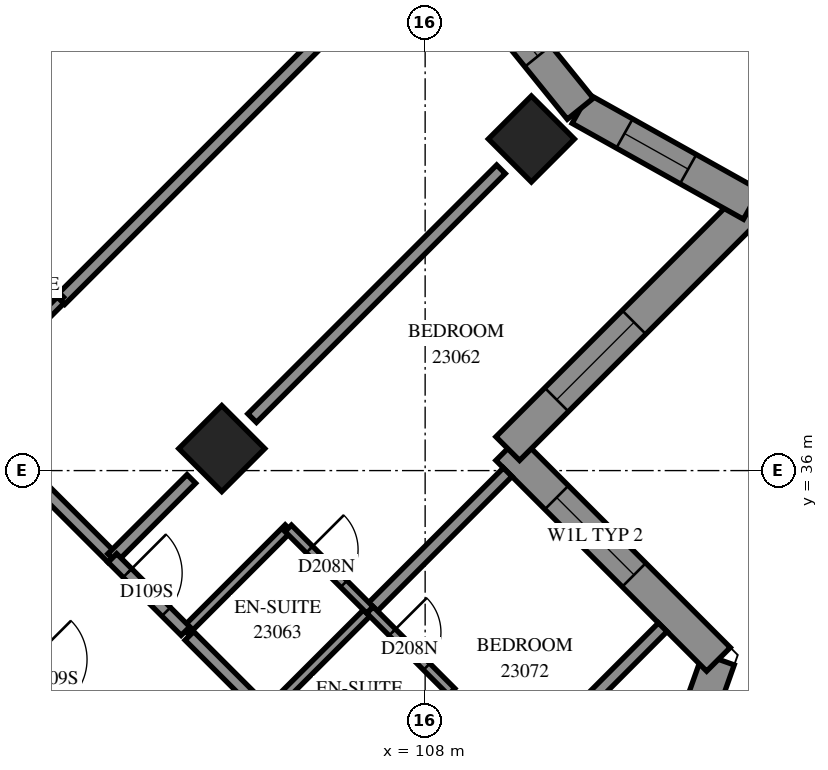
"""IFC4 building model, lengths in metres.
Left out: names, types, materials, properties, quantities, classifications, styles, units other than length and angle.
Written with IfcOpenShell. Run it as: python <this file> out.ifc"""

import sys

from ifc_helpers import new_model, si_unit, direction, frame, frame_2d, origin, origin_2d, place, context, subcontext, project, spatial, polyline, rectangle, outline, extrude, element, fill, save


model = new_model("IFC4")
c1 = context("Model", 3, precision=1e-05, world=origin(), true_north=direction((0.0, 1.0)))
c2 = subcontext(c1, "Body", "Model", "MODEL_VIEW")
j1 = project(units=[si_unit("LENGTHUNIT", "METRE"), si_unit("PLANEANGLEUNIT", "RADIAN")], contexts=[c1])
p1 = place(None, origin())
s1 = spatial("IfcSite", under=j1, at=p1, CompositionType="ELEMENT")
p2 = place(p1, origin())
s2 = spatial("IfcBuilding", under=s1, at=p2, CompositionType="ELEMENT")
p3 = place(p2, frame((0.0, 0.0, 88.0)))
s3 = spatial("IfcBuildingStorey", under=s2, at=p3, CompositionType="ELEMENT", Elevation=88.0)
for number, where, z_axis, x_axis in (
    (1, (109.747, 41.453, 0.0), (0.0, 0.0, 1.0), (0.707, -0.707, 0.0)),
    (2, (104.656, 36.362, 0.0), (0.0, 0.0, 1.0), (0.707, -0.707, 0.0)),
):
    element("IfcColumn", number, at=place(p3, frame(where, z_axis=z_axis, x_axis=x_axis)), inside=s3, PredefinedType="COLUMN", context=c2, shape_type="SweptSolid", body=[
        extrude(rectangle(XDim=1.0, YDim=1.0, at=origin_2d()), origin(), (0.0, 0.0, 1.0), 3.1),
    ])
p4 = place(p3, frame((111.057, 27.917, 0.0), z_axis=(0.0, 0.0, 1.0), x_axis=(0.334430452, 0.9424204331, 0.0)))
e3 = element("IfcWall", 3, at=p4, inside=s3, PredefinedType="SOLIDWALL", context=c2, shape_type="SweptSolid", body=[
    extrude(outline(polyline([(-0.125, -0.275), (5.457, -0.275), (5.11, 0.275), (0.125, 0.275), (-0.125, -0.275)])), origin(), (0.0, 0.0, 1.0), 3.1),
])
p5 = place(p4, frame((1.447, 0.0, 0.5)))
e4 = element("IfcOpeningElement", 4, at=p5, cuts=e3, PredefinedType="OPENING", context=c2, shape_type="SweptSolid", body=[
    extrude(rectangle(XDim=1.3, YDim=2.45, at=frame_2d((0.65, 1.225))), frame((0.0, 0.285, 0.0), z_axis=(0.0, -1.0, 0.0), x_axis=(1.0, 0.0, 0.0)), (0.0, 0.0, 1.0), 0.57),
])
p6 = place(p4, frame((2.947, 0.0, 0.5)))
e5 = element("IfcOpeningElement", 5, at=p6, cuts=e3, PredefinedType="OPENING", context=c2, shape_type="SweptSolid", body=[
    extrude(rectangle(XDim=1.3, YDim=2.45, at=frame_2d((0.65, 1.225))), frame((0.0, 0.285, 0.0), z_axis=(0.0, -1.0, 0.0), x_axis=(1.0, 0.0, 0.0)), (0.0, 0.0, 1.0), 0.57),
])
p7 = place(p3, frame((112.824, 32.896, 0.0), z_axis=(0.0, 0.0, 1.0), x_axis=(-0.7071067812, 0.7071067812, 0.0)))
e6 = element("IfcWall", 6, at=p7, inside=s3, PredefinedType="SOLIDWALL", context=c2, shape_type="SweptSolid", body=[
    extrude(outline(polyline([(-0.174, -0.275), (4.626, -0.275), (5.176, 0.275), (0.174, 0.275), (-0.174, -0.275)])), origin(), (0.0, 0.0, 1.0), 3.1),
])
p8 = place(p7, frame((1.964, 0.0, 0.6)))
e7 = element("IfcOpeningElement", 7, at=p8, cuts=e6, PredefinedType="OPENING", context=c2, shape_type="SweptSolid", body=[
    extrude(rectangle(XDim=1.8, YDim=1.9, at=frame_2d((0.9, 0.95))), frame((0.0, 0.285, 0.0), z_axis=(0.0, -1.0, 0.0), x_axis=(1.0, 0.0, 0.0)), (0.0, 0.0, 1.0), 0.57),
])
p9 = place(p3, frame((109.358, 36.362, 0.0), z_axis=(0.0, 0.0, 1.0), x_axis=(0.7071067812, 0.7071067812, 0.0)))
e8 = element("IfcWall", 8, at=p9, inside=s3, PredefinedType="SOLIDWALL", context=c2, shape_type="SweptSolid", body=[
    extrude(outline(polyline([(0.275, -0.275), (6.036, -0.275), (5.309, 0.275), (-0.275, 0.275), (0.275, -0.275)])), origin(), (0.0, 0.0, 1.0), 3.1),
])
p10 = place(p9, frame((1.137, 0.0, 0.6)))
e9 = element("IfcOpeningElement", 9, at=p10, cuts=e8, PredefinedType="OPENING", context=c2, shape_type="SweptSolid", body=[
    extrude(rectangle(XDim=1.8, YDim=1.9, at=frame_2d((0.9, 0.95))), frame((0.0, 0.285, 0.0), z_axis=(0.0, -1.0, 0.0), x_axis=(1.0, 0.0, 0.0)), (0.0, 0.0, 1.0), 0.57),
])
p11 = place(p3, frame((113.369, 40.373, 0.0), z_axis=(0.0, 0.0, 1.0), x_axis=(-0.8725208006, 0.4885769668, 0.0)))
e10 = element("IfcWall", 10, at=p11, inside=s3, PredefinedType="SOLIDWALL", context=c2, shape_type="SweptSolid", body=[
    extrude(outline(polyline([(-0.363, -0.275), (3.176, -0.275), (3.282, 0.275), (0.363, 0.275), (-0.363, -0.275)])), origin(), (0.0, 0.0, 1.0), 3.1),
])
p12 = place(p11, frame((1.196, 0.0, 0.5)))
e11 = element("IfcOpeningElement", 11, at=p12, cuts=e10, PredefinedType="OPENING", context=c2, shape_type="SweptSolid", body=[
    extrude(rectangle(XDim=1.2, YDim=2.45, at=frame_2d((0.6, 1.225))), frame((0.0, 0.285, 0.0), z_axis=(0.0, -1.0, 0.0), x_axis=(1.0, 0.0, 0.0)), (0.0, 0.0, 1.0), 0.57),
])
p13 = place(p3, frame((110.552, 41.951, 0.0), z_axis=(0.0, 0.0, 1.0), x_axis=(-0.6286568792, 0.7776827941, 0.0)))
e12 = element("IfcWall", 12, at=p13, inside=s3, PredefinedType="SOLIDWALL", context=c2, shape_type="SweptSolid", body=[
    extrude(outline(polyline([(0.053, -0.275), (3.479, -0.275), (3.421, 0.275), (-0.053, 0.275), (0.053, -0.275)])), origin(), (0.0, 0.0, 1.0), 3.1),
])
p14 = place(p13, frame((1.11, 0.0, 0.5)))
e13 = element("IfcOpeningElement", 13, at=p14, cuts=e12, PredefinedType="OPENING", context=c2, shape_type="SweptSolid", body=[
    extrude(rectangle(XDim=1.2, YDim=2.45, at=frame_2d((0.6, 1.225))), frame((0.0, 0.285, 0.0), z_axis=(0.0, -1.0, 0.0), x_axis=(1.0, 0.0, 0.0)), (0.0, 0.0, 1.0), 0.57),
])
p15 = place(p3, frame((95.215, 42.197, 0.0), z_axis=(0.0, 0.0, 1.0), x_axis=(0.7071067812, 0.7071067812, 0.0)))
e14 = element("IfcWall", 14, at=p15, inside=s3, PredefinedType="PARTITIONING", context=c2, shape_type="SweptSolid", body=[
    extrude(rectangle(XDim=10.675, YDim=0.2, at=frame_2d((5.338, 0.0))), origin(), (0.0, 0.0, 1.0), 3.1),
])
p16 = place(p3, frame((102.002, 38.804, 0.0), z_axis=(0.0, 0.0, 1.0), x_axis=(0.7072390372, 0.7069745004, 0.0)))
e15 = element("IfcWall", 15, at=p16, inside=s3, PredefinedType="PARTITIONING", context=c2, shape_type="SweptSolid", body=[
    extrude(rectangle(XDim=8.316, YDim=0.2, at=frame_2d((4.158, 0.0))), origin(), (0.0, 0.0, 1.0), 3.1),
])
p17 = place(p3, frame((101.365, 33.071, 0.0), z_axis=(0.0, 0.0, 1.0), x_axis=(0.7071067812, -0.7071067812, 0.0)))
e16 = element("IfcWall", 16, at=p17, inside=s3, PredefinedType="PARTITIONING", context=c2, shape_type="SweptSolid", body=[
    extrude(rectangle(XDim=7.2, YDim=0.2, at=frame_2d((3.6, 0.0))), origin(), (0.0, 0.0, 1.0), 3.1),
])
p18 = place(p17, frame((0.248, 0.0, 0.0)))
e17 = element("IfcOpeningElement", 17, at=p18, cuts=e16, PredefinedType="OPENING", context=c2, shape_type="SweptSolid", body=[
    extrude(rectangle(XDim=0.9, YDim=2.1, at=frame_2d((0.45, 1.05))), frame((0.0, 0.11, 0.0), z_axis=(0.0, -1.0, 0.0), x_axis=(1.0, 0.0, 0.0)), (0.0, 0.0, 1.0), 0.22),
])
p19 = place(p17, frame((5.95, 0.0, 0.0)))
e18 = element("IfcOpeningElement", 18, at=p19, cuts=e16, PredefinedType="OPENING", context=c2, shape_type="SweptSolid", body=[
    extrude(rectangle(XDim=0.9, YDim=2.1, at=frame_2d((0.45, 1.05))), frame((0.0, 0.11, 0.0), z_axis=(0.0, -1.0, 0.0), x_axis=(1.0, 0.0, 0.0)), (0.0, 0.0, 1.0), 0.22),
])
p20 = place(p3, frame((105.155, 36.863, 0.0), z_axis=(0.0, 0.0, 1.0), x_axis=(0.7071067812, 0.7071067812, 0.0)))
e19 = element("IfcWall", 19, at=p20, inside=s3, PredefinedType="PARTITIONING", context=c2, shape_type="SweptSolid", body=[
    extrude(rectangle(XDim=5.787, YDim=0.2, at=frame_2d((2.893, 0.0))), origin(), (0.0, 0.0, 1.0), 3.1),
])
p21 = place(p3, frame((104.123, 33.282, 0.0), z_axis=(0.0, 0.0, 1.0), x_axis=(0.7071067812, -0.7071067812, 0.0)))
e20 = element("IfcWall", 20, at=p21, inside=s3, PredefinedType="PARTITIONING", context=c2, shape_type="SweptSolid", body=[
    extrude(rectangle(XDim=5.399, YDim=0.2, at=frame_2d((2.7, 0.0))), origin(), (0.0, 0.0, 1.0), 3.1),
])
p22 = place(p21, frame((4.08, 0.0, 0.0)))
e21 = element("IfcOpeningElement", 21, at=p22, cuts=e20, PredefinedType="OPENING", context=c2, shape_type="SweptSolid", body=[
    extrude(rectangle(XDim=0.9, YDim=2.1, at=frame_2d((0.45, 1.05))), frame((0.0, 0.11, 0.0), z_axis=(0.0, -1.0, 0.0), x_axis=(1.0, 0.0, 0.0)), (0.0, 0.0, 1.0), 0.22),
])
p23 = place(p3, frame((100.31, 37.106, 0.0), z_axis=(0.0, 0.0, 1.0), x_axis=(0.7073845681, -0.7068288851, 0.0)))
e22 = element("IfcWall", 22, at=p23, inside=s3, PredefinedType="PARTITIONING", context=c2, shape_type="SweptSolid", body=[
    extrude(rectangle(XDim=3.599, YDim=0.2, at=frame_2d((1.8, 0.0))), origin(), (0.0, 0.0, 1.0), 3.1),
])
p24 = place(p3, frame((107.095, 33.711, 0.0), z_axis=(0.0, 0.0, 1.0), x_axis=(0.7071067812, 0.7071067812, 0.0)))
e23 = element("IfcWall", 23, at=p24, inside=s3, PredefinedType="PARTITIONING", context=c2, shape_type="SweptSolid", body=[
    extrude(rectangle(XDim=3.2, YDim=0.2, at=frame_2d((1.6, 0.0))), origin(), (0.0, 0.0, 1.0), 3.1),
])
p25 = place(p3, frame((100.233, 40.567, 0.0), z_axis=(0.0, 0.0, 1.0), x_axis=(0.7071067812, -0.7071067812, 0.0)))
e24 = element("IfcWall", 24, at=p25, inside=s3, PredefinedType="PARTITIONING", context=c2, shape_type="SweptSolid", body=[
    extrude(rectangle(XDim=2.5, YDim=0.15, at=frame_2d((1.25, 0.0))), origin(), (0.0, 0.0, 1.0), 3.1),
])
p26 = place(p25, frame((0.883, 0.0, 0.0)))
e25 = element("IfcOpeningElement", 25, at=p26, cuts=e24, PredefinedType="OPENING", context=c2, shape_type="SweptSolid", body=[
    extrude(rectangle(XDim=0.8, YDim=2.1, at=frame_2d((0.4, 1.05))), frame((0.0, 0.085, 0.0), z_axis=(0.0, -1.0, 0.0), x_axis=(1.0, 0.0, 0.0)), (0.0, 0.0, 1.0), 0.17),
])
for number, where, z_axis, x_axis in (
    (26, (100.308, 37.103, 0.0), (0.0, 0.0, 1.0), (0.707, 0.708, 0.0)),
    (27, (105.396, 32.016, 0.0), (0.0, 0.0, 1.0), (0.708, 0.707, 0.0)),
):
    element("IfcWall", number, at=place(p3, frame(where, z_axis=z_axis, x_axis=x_axis)), inside=s3, PredefinedType="PARTITIONING", context=c2, shape_type="SweptSolid", body=[
        extrude(rectangle(XDim=2.4, YDim=0.15, at=frame_2d((1.2, 0.0))), origin(), (0.0, 0.0, 1.0), 3.1),
    ])
for number, where, z_axis, x_axis in (
    (28, (104.055, 33.359, 0.0), (0.0, 0.0, 1.0), (0.707, 0.707, 0.0)),
    (29, (106.741, 30.671, 0.0), (0.0, 0.0, 1.0), (0.707, 0.707, 0.0)),
):
    element("IfcWall", number, at=place(p3, frame(where, z_axis=z_axis, x_axis=x_axis)), inside=s3, PredefinedType="PARTITIONING", context=c2, shape_type="SweptSolid", body=[
        extrude(rectangle(XDim=2.398, YDim=0.15, at=frame_2d((1.199, 0.0))), origin(), (0.0, 0.0, 1.0), 3.1),
    ])
p27 = place(p3, frame((110.251, 31.767, 0.0), z_axis=(0.0, 0.0, 1.0), x_axis=(0.7066584143, 0.7075548639, 0.0)))
e30 = element("IfcWall", 30, at=p27, inside=s3, PredefinedType="PARTITIONING", context=c2, shape_type="SweptSolid", body=[
    extrude(rectangle(XDim=2.343, YDim=0.2, at=frame_2d((1.171, 0.0))), origin(), (0.0, 0.0, 1.0), 3.1),
])
p28 = place(p3, frame((105.749, 35.051, 0.0), z_axis=(0.0, 0.0, 1.0), x_axis=(0.7071067812, -0.7071067812, 0.0)))
e31 = element("IfcWall", 31, at=p28, inside=s3, PredefinedType="PARTITIONING", context=c2, shape_type="SweptSolid", body=[
    extrude(rectangle(XDim=1.901, YDim=0.15, at=frame_2d((0.95, 0.0))), origin(), (0.0, 0.0, 1.0), 3.1),
])
p29 = place(p28, frame((0.493, 0.0, 0.0)))
e32 = element("IfcOpeningElement", 32, at=p29, cuts=e31, PredefinedType="OPENING", context=c2, shape_type="SweptSolid", body=[
    extrude(rectangle(XDim=0.8, YDim=2.1, at=frame_2d((0.4, 1.05))), frame((0.0, 0.085, 0.0), z_axis=(0.0, -1.0, 0.0), x_axis=(1.0, 0.0, 0.0)), (0.0, 0.0, 1.0), 0.17),
])
p30 = place(p3, frame((107.094, 33.708, 0.0), z_axis=(0.0, 0.0, 1.0), x_axis=(0.7065800724, -0.7076330979, 0.0)))
e33 = element("IfcWall", 33, at=p30, inside=s3, PredefinedType="PARTITIONING", context=c2, shape_type="SweptSolid", body=[
    extrude(rectangle(XDim=1.899, YDim=0.15, at=frame_2d((0.95, 0.0))), origin(), (0.0, 0.0, 1.0), 3.1),
])
p31 = place(p30, frame((0.519, 0.0, 0.0)))
e34 = element("IfcOpeningElement", 34, at=p31, cuts=e33, PredefinedType="OPENING", context=c2, shape_type="SweptSolid", body=[
    extrude(rectangle(XDim=0.8, YDim=2.1, at=frame_2d((0.4, 1.05))), frame((0.0, 0.085, 0.0), z_axis=(0.0, -1.0, 0.0), x_axis=(1.0, 0.0, 0.0)), (0.0, 0.0, 1.0), 0.17),
])
p32 = place(p3, frame((102.853, 34.561, 0.0), z_axis=(0.0, 0.0, 1.0), x_axis=(0.7071067812, 0.7071067812, 0.0)))
e35 = element("IfcWall", 35, at=p32, inside=s3, PredefinedType="PARTITIONING", context=c2, shape_type="SweptSolid", body=[
    extrude(rectangle(XDim=1.841, YDim=0.2, at=frame_2d((0.921, 0.0))), origin(), (0.0, 0.0, 1.0), 3.1),
])
p33 = place(p3, frame((102.857, 34.563, 0.0), z_axis=(0.0, 0.0, 1.0), x_axis=(0.7071067812, -0.7071067812, 0.0)))
e36 = element("IfcWall", 36, at=p33, inside=s3, PredefinedType="PARTITIONING", context=c2, shape_type="SweptSolid", body=[
    extrude(rectangle(XDim=1.7, YDim=0.2, at=frame_2d((0.85, 0.0))), origin(), (0.0, 0.0, 1.0), 3.1),
])
p34 = place(p33, frame((0.35, 0.0, 0.0)))
e37 = element("IfcOpeningElement", 37, at=p34, cuts=e36, PredefinedType="OPENING", context=c2, shape_type="SweptSolid", body=[
    extrude(rectangle(XDim=0.9, YDim=2.1, at=frame_2d((0.45, 1.05))), frame((0.0, 0.11, 0.0), z_axis=(0.0, -1.0, 0.0), x_axis=(1.0, 0.0, 0.0)), (0.0, 0.0, 1.0), 0.22),
])
p35 = place(p8, origin())
e38 = element("IfcWindow", 38, at=p35, inside=s3, PartitioningType="SINGLE_PANEL", PredefinedType="WINDOW", context=c2, shape_type="SweptSolid", body=[
    extrude(rectangle(XDim=1.8, YDim=1.9, at=frame_2d((0.9, 0.95))), frame((0.0, 0.155, 0.0), z_axis=(0.0, -1.0, 0.0), x_axis=(1.0, 0.0, 0.0)), (0.0, 0.0, 1.0), 0.06),
])
fill(e7, e38)
p36 = place(p10, origin())
e39 = element("IfcWindow", 39, at=p36, inside=s3, PartitioningType="SINGLE_PANEL", PredefinedType="WINDOW", context=c2, shape_type="SweptSolid", body=[
    extrude(rectangle(XDim=1.8, YDim=1.9, at=frame_2d((0.9, 0.95))), frame((0.0, 0.155, 0.0), z_axis=(0.0, -1.0, 0.0), x_axis=(1.0, 0.0, 0.0)), (0.0, 0.0, 1.0), 0.06),
])
fill(e9, e39)
p37 = place(p12, origin())
e40 = element("IfcWindow", 40, at=p37, inside=s3, PartitioningType="SINGLE_PANEL", PredefinedType="WINDOW", context=c2, shape_type="SweptSolid", body=[
    extrude(rectangle(XDim=1.2, YDim=2.45, at=frame_2d((0.6, 1.225))), frame((0.0, 0.155, 0.0), z_axis=(0.0, -1.0, 0.0), x_axis=(1.0, 0.0, 0.0)), (0.0, 0.0, 1.0), 0.06),
])
fill(e11, e40)
p38 = place(p14, origin())
e41 = element("IfcWindow", 41, at=p38, inside=s3, PartitioningType="SINGLE_PANEL", PredefinedType="WINDOW", context=c2, shape_type="SweptSolid", body=[
    extrude(rectangle(XDim=1.2, YDim=2.45, at=frame_2d((0.6, 1.225))), frame((0.0, 0.155, 0.0), z_axis=(0.0, -1.0, 0.0), x_axis=(1.0, 0.0, 0.0)), (0.0, 0.0, 1.0), 0.06),
])
fill(e13, e41)
p39 = place(p34, origin())
e42 = element("IfcDoor", 42, at=p39, inside=s3, OperationType="SINGLE_SWING_LEFT", PredefinedType="DOOR", context=c2, shape_type="SweptSolid", body=[
    extrude(rectangle(XDim=0.9, YDim=2.1, at=frame_2d((0.45, 1.05))), frame((0.0, 0.025, 0.0), z_axis=(0.0, -1.0, 0.0), x_axis=(1.0, 0.0, 0.0)), (0.0, 0.0, 1.0), 0.05),
])
fill(e37, e42)
p40 = place(p29, origin())
e43 = element("IfcDoor", 43, at=p40, inside=s3, OperationType="SINGLE_SWING_RIGHT", PredefinedType="DOOR", context=c2, shape_type="SweptSolid", body=[
    extrude(rectangle(XDim=0.8, YDim=2.1, at=frame_2d((0.4, 1.05))), frame((0.0, 0.025, 0.0), z_axis=(0.0, -1.0, 0.0), x_axis=(1.0, 0.0, 0.0)), (0.0, 0.0, 1.0), 0.05),
])
fill(e32, e43)
p41 = place(p18, origin())
e44 = element("IfcDoor", 44, at=p41, inside=s3, OperationType="SINGLE_SWING_RIGHT", PredefinedType="DOOR", context=c2, shape_type="SweptSolid", body=[
    extrude(rectangle(XDim=0.9, YDim=2.1, at=frame_2d((0.45, 1.05))), frame((0.0, 0.025, 0.0), z_axis=(0.0, -1.0, 0.0), x_axis=(1.0, 0.0, 0.0)), (0.0, 0.0, 1.0), 0.05),
])
fill(e17, e44)
p42 = place(p31, origin())
e45 = element("IfcDoor", 45, at=p42, inside=s3, OperationType="SINGLE_SWING_RIGHT", PredefinedType="DOOR", context=c2, shape_type="SweptSolid", body=[
    extrude(rectangle(XDim=0.8, YDim=2.1, at=frame_2d((0.4, 1.05))), frame((0.0, 0.025, 0.0), z_axis=(0.0, -1.0, 0.0), x_axis=(1.0, 0.0, 0.0)), (0.0, 0.0, 1.0), 0.05),
])
fill(e34, e45)
save(model, sys.argv[1])
